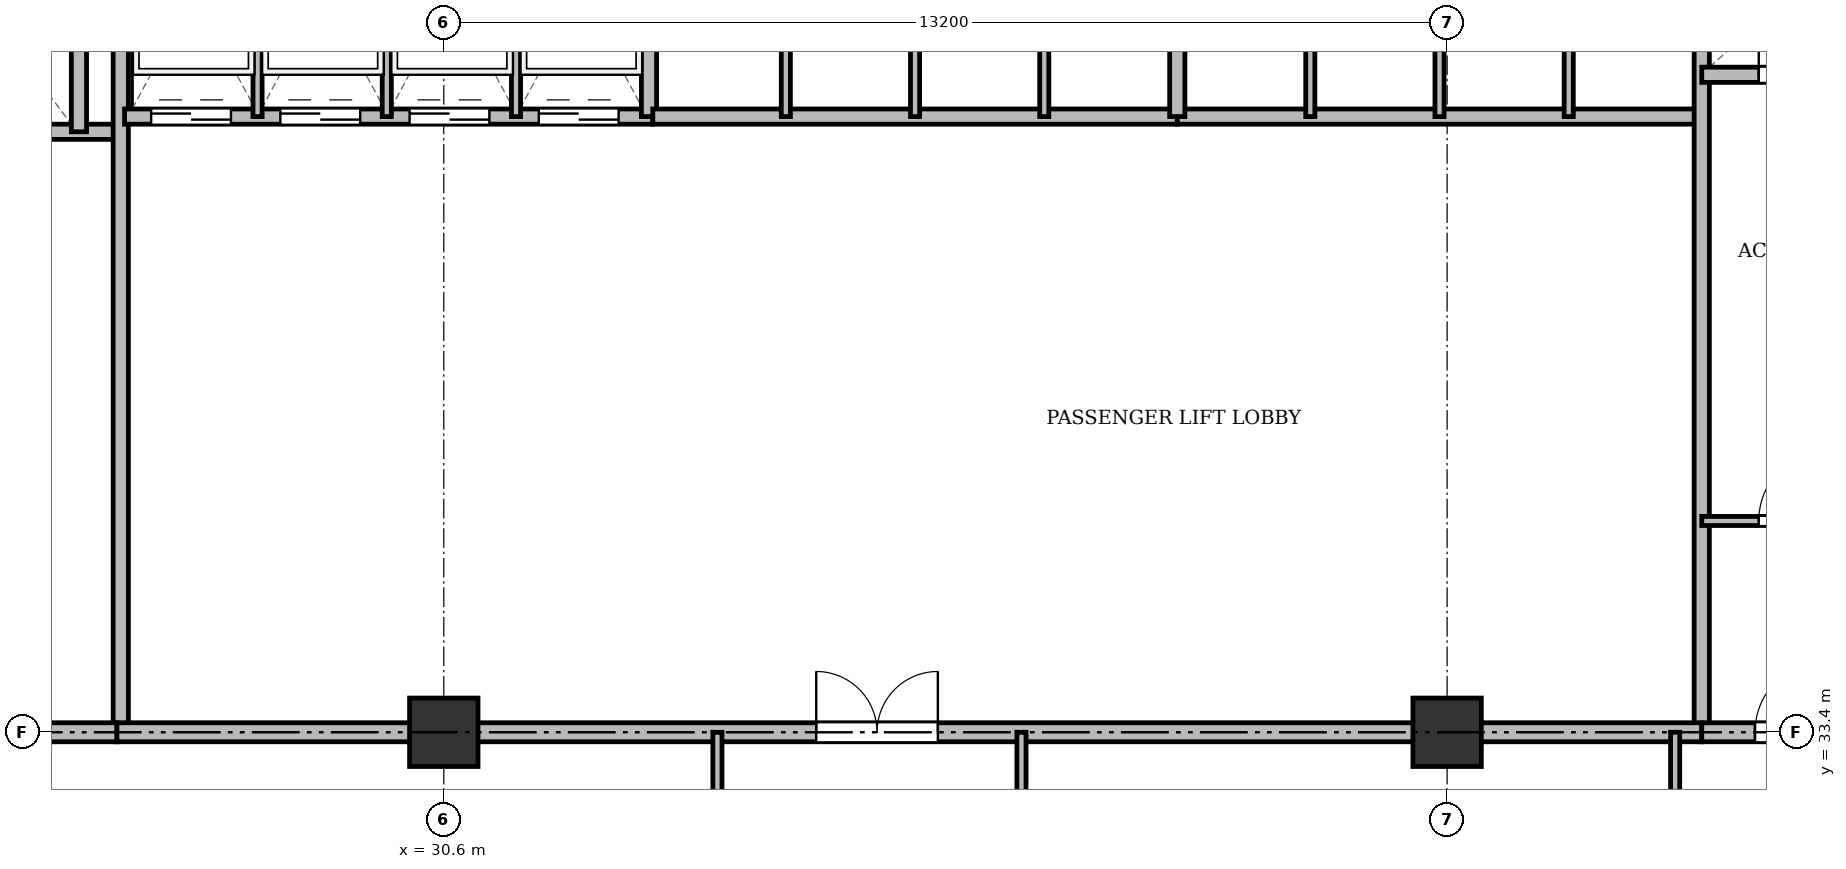
"""IFC4 building model, lengths in metres.
Left out: names, types, materials, properties, quantities, classifications, styles, units other than length and angle.
Written with IfcOpenShell. Run it as: python <this file> out.ifc"""

import sys

from ifc_helpers import new_model, si_unit, direction, frame, frame_2d, origin, origin_2d, place, context, subcontext, project, spatial, rectangle, extrude, source, transform, mapped, element, fill, save


model = new_model("IFC4")
c1 = context("Model", 3, precision=1e-05, world=origin(), true_north=direction((0.0, 1.0)))
c2 = subcontext(c1, "Body", "Model", "MODEL_VIEW")
j1 = project(units=[si_unit("LENGTHUNIT", "METRE"), si_unit("PLANEANGLEUNIT", "RADIAN")], contexts=[c1])
p1 = place(None, origin())
s1 = spatial("IfcSite", under=j1, at=p1, CompositionType="ELEMENT")
p2 = place(p1, origin())
s2 = spatial("IfcBuilding", under=s1, at=p2, CompositionType="ELEMENT")
p3 = place(p2, frame((0.0, 0.0, 48.7)))
s3 = spatial("IfcBuildingStorey", under=s2, at=p3, CompositionType="ELEMENT", Elevation=48.7)
m1 = source(origin(), c2, "Body", "SweptSolid", [
    extrude(rectangle(XDim=0.9, YDim=0.9, at=origin_2d()), origin(), (0.0, 0.0, 1.0), 3.6),
])
for number, where, z_axis, x_axis in (
    (1, (30.6, 33.4, 0.0), (0.0, 0.0, 1.0), (1.0, 0.0, 0.0)),
    (2, (43.8, 33.4, 0.0), (0.0, 0.0, 1.0), (1.0, 0.0, 0.0)),
):
    element("IfcColumn", number, at=place(p3, frame(where, z_axis=z_axis, x_axis=x_axis)), inside=s3, PredefinedType="COLUMN", context=c2, shape_type="MappedRepresentation", body=[
        mapped(m1, transform((0.0, 0.0, 0.0), x_axis=(1.0, 0.0, 0.0), y_axis=(0.0, 1.0, 0.0), z_axis=(0.0, 0.0, 1.0), scale=1.0)),
    ])
p4 = place(p3, frame((19.55, 41.3, 0.0), z_axis=(0.0, 0.0, 1.0), x_axis=(1.0, 0.0, 0.0)))
e3 = element("IfcWall", 3, at=p4, inside=s3, PredefinedType="SOLIDWALL", context=c2, shape_type="SweptSolid", body=[
    extrude(rectangle(XDim=6.75, YDim=0.2, at=frame_2d((3.375, 0.0))), origin(), (0.0, 0.0, 1.0), 3.34),
])
p5 = place(p4, frame((1.7, 0.0, 0.0)))
e4 = element("IfcOpeningElement", 4, at=p5, cuts=e3, PredefinedType="OPENING", context=c2, shape_type="SweptSolid", body=[
    extrude(rectangle(XDim=1.1, YDim=2.15, at=frame_2d((0.55, 1.075))), frame((0.0, 0.11, 0.0), z_axis=(0.0, -1.0, 0.0), x_axis=(1.0, 0.0, 0.0)), (0.0, 0.0, 1.0), 0.22),
])
p6 = place(p4, frame((4.4, 0.0, 0.0)))
e5 = element("IfcOpeningElement", 5, at=p6, cuts=e3, PredefinedType="OPENING", context=c2, shape_type="SweptSolid", body=[
    extrude(rectangle(XDim=1.1, YDim=2.15, at=frame_2d((0.55, 1.075))), frame((0.0, 0.11, 0.0), z_axis=(0.0, -1.0, 0.0), x_axis=(1.0, 0.0, 0.0)), (0.0, 0.0, 1.0), 0.22),
])
p7 = place(p3, frame((25.8, 41.3, 0.0), z_axis=(0.0, 0.0, 1.0), x_axis=(0.0, 1.0, 0.0)))
e6 = element("IfcWall", 6, at=p7, inside=s3, PredefinedType="SOLIDWALL", context=c2, shape_type="SweptSolid", body=[
    extrude(rectangle(XDim=3.4, YDim=0.2, at=frame_2d((1.7, 0.0))), origin(), (0.0, 0.0, 1.0), 3.34),
])
p8 = place(p3, frame((26.35, 33.4, 0.0), z_axis=(0.0, 0.0, 1.0), x_axis=(0.0, 1.0, 0.0)))
e7 = element("IfcWall", 7, at=p8, inside=s3, PredefinedType="SOLIDWALL", context=c2, shape_type="SweptSolid", body=[
    extrude(rectangle(XDim=11.3, YDim=0.2, at=frame_2d((5.65, 0.0))), origin(), (0.0, 0.0, 1.0), 2.69),
])
p9 = place(p3, frame((19.5, 33.4, 0.0), z_axis=(0.0, 0.0, 1.0), x_axis=(1.0, 0.0, 0.0)))
e8 = element("IfcWall", 8, at=p9, inside=s3, PredefinedType="PARTITIONING", context=c2, shape_type="SweptSolid", body=[
    extrude(rectangle(XDim=6.8, YDim=0.25, at=frame_2d((3.4, 0.0))), origin(), (0.0, 0.0, 1.0), 2.69),
])
p10 = place(p9, frame((0.75, 0.0, 0.0)))
e9 = element("IfcOpeningElement", 9, at=p10, cuts=e8, PredefinedType="OPENING", context=c2, shape_type="SweptSolid", body=[
    extrude(rectangle(XDim=1.6, YDim=2.2, at=frame_2d((0.8, 1.1))), frame((0.0, 0.135, 0.0), z_axis=(0.0, -1.0, 0.0), x_axis=(1.0, 0.0, 0.0)), (0.0, 0.0, 1.0), 0.27),
])
p11 = place(p3, frame((26.4, 41.5, 0.0), z_axis=(0.0, 0.0, 1.0), x_axis=(1.0, 0.0, 0.0)))
e10 = element("IfcWall", 10, at=p11, inside=s3, PredefinedType="SOLIDWALL", context=c2, shape_type="SweptSolid", body=[
    extrude(rectangle(XDim=6.95, YDim=0.2, at=frame_2d((3.475, 0.0))), origin(), (0.0, 0.0, 1.0), 3.34),
])
p12 = place(p11, frame((0.35, 0.0, 0.0)))
e11 = element("IfcOpeningElement", 11, at=p12, cuts=e10, PredefinedType="OPENING", context=c2, shape_type="SweptSolid", body=[
    extrude(rectangle(XDim=1.05, YDim=2.15, at=frame_2d((0.525, 1.075))), frame((0.0, 0.11, 0.0), z_axis=(0.0, -1.0, 0.0), x_axis=(1.0, 0.0, 0.0)), (0.0, 0.0, 1.0), 0.22),
])
p13 = place(p11, frame((2.05, 0.0, 0.0)))
e12 = element("IfcOpeningElement", 12, at=p13, cuts=e10, PredefinedType="OPENING", context=c2, shape_type="SweptSolid", body=[
    extrude(rectangle(XDim=1.05, YDim=2.15, at=frame_2d((0.525, 1.075))), frame((0.0, 0.11, 0.0), z_axis=(0.0, -1.0, 0.0), x_axis=(1.0, 0.0, 0.0)), (0.0, 0.0, 1.0), 0.22),
])
p14 = place(p11, frame((3.75, 0.0, 0.0)))
e13 = element("IfcOpeningElement", 13, at=p14, cuts=e10, PredefinedType="OPENING", context=c2, shape_type="SweptSolid", body=[
    extrude(rectangle(XDim=1.05, YDim=2.15, at=frame_2d((0.525, 1.075))), frame((0.0, 0.11, 0.0), z_axis=(0.0, -1.0, 0.0), x_axis=(1.0, 0.0, 0.0)), (0.0, 0.0, 1.0), 0.22),
])
p15 = place(p11, frame((5.45, 0.0, 0.0)))
e14 = element("IfcOpeningElement", 14, at=p15, cuts=e10, PredefinedType="OPENING", context=c2, shape_type="SweptSolid", body=[
    extrude(rectangle(XDim=1.05, YDim=2.15, at=frame_2d((0.525, 1.075))), frame((0.0, 0.11, 0.0), z_axis=(0.0, -1.0, 0.0), x_axis=(1.0, 0.0, 0.0)), (0.0, 0.0, 1.0), 0.22),
])
p16 = place(p3, frame((33.3, 41.5, 0.0), z_axis=(0.0, 0.0, 1.0), x_axis=(0.0, 1.0, 0.0)))
e15 = element("IfcWall", 15, at=p16, inside=s3, PredefinedType="SOLIDWALL", context=c2, shape_type="SweptSolid", body=[
    extrude(rectangle(XDim=3.2, YDim=0.2, at=frame_2d((1.6, 0.0))), origin(), (0.0, 0.0, 1.0), 3.34),
])
for number, where, z_axis, x_axis in (
    (16, (28.15, 41.5, 0.0), (0.0, 0.0, 1.0), (0.0, 1.0, 0.0)),
    (17, (29.85, 41.5, 0.0), (0.0, 0.0, 1.0), (0.0, 1.0, 0.0)),
    (18, (31.55, 41.5, 0.0), (0.0, 0.0, 1.0), (0.0, 1.0, 0.0)),
):
    element("IfcWall", number, at=place(p3, frame(where, z_axis=z_axis, x_axis=x_axis)), inside=s3, PredefinedType="PARTITIONING", context=c2, shape_type="SweptSolid", body=[
        extrude(rectangle(XDim=3.2, YDim=0.12, at=frame_2d((1.6, 0.0))), origin(), (0.0, 0.0, 1.0), 3.34),
    ])
p17 = place(p3, frame((33.35, 41.5, 0.0), z_axis=(0.0, 0.0, 1.0), x_axis=(1.0, 0.0, 0.0)))
e19 = element("IfcWall", 19, at=p17, inside=s3, PredefinedType="SOLIDWALL", context=c2, shape_type="SweptSolid", body=[
    extrude(rectangle(XDim=6.9, YDim=0.2, at=frame_2d((3.45, 0.0))), origin(), (0.0, 0.0, 1.0), 3.34),
])
for number, where, z_axis, x_axis in (
    (20, (35.1, 41.5, 0.0), (0.0, 0.0, 1.0), (0.0, 1.0, 0.0)),
    (21, (36.8, 41.5, 0.0), (0.0, 0.0, 1.0), (0.0, 1.0, 0.0)),
    (22, (38.5, 41.5, 0.0), (0.0, 0.0, 1.0), (0.0, 1.0, 0.0)),
):
    element("IfcWall", number, at=place(p3, frame(where, z_axis=z_axis, x_axis=x_axis)), inside=s3, PredefinedType="PARTITIONING", context=c2, shape_type="SweptSolid", body=[
        extrude(rectangle(XDim=3.2, YDim=0.12, at=frame_2d((1.6, 0.0))), origin(), (0.0, 0.0, 1.0), 3.34),
    ])
p18 = place(p3, frame((40.25, 41.5, 0.0), z_axis=(0.0, 0.0, 1.0), x_axis=(1.0, 0.0, 0.0)))
e23 = element("IfcWall", 23, at=p18, inside=s3, PredefinedType="SOLIDWALL", context=c2, shape_type="SweptSolid", body=[
    extrude(rectangle(XDim=6.9, YDim=0.2, at=frame_2d((3.45, 0.0))), origin(), (0.0, 0.0, 1.0), 2.752),
])
p19 = place(p3, frame((40.25, 41.5, 0.0), z_axis=(0.0, 0.0, 1.0), x_axis=(0.0, 1.0, 0.0)))
e24 = element("IfcWall", 24, at=p19, inside=s3, PredefinedType="SOLIDWALL", context=c2, shape_type="SweptSolid", body=[
    extrude(rectangle(XDim=3.2, YDim=0.2, at=frame_2d((1.6, 0.0))), origin(), (0.0, 0.0, 1.0), 3.34),
])
p20 = place(p3, frame((42.0, 41.5, 0.0), z_axis=(0.0, 0.0, 1.0), x_axis=(0.0, 1.0, 0.0)))
e25 = element("IfcWall", 25, at=p20, inside=s3, PredefinedType="PARTITIONING", context=c2, shape_type="SweptSolid", body=[
    extrude(rectangle(XDim=3.2, YDim=0.12, at=frame_2d((1.6, 0.0))), origin(), (0.0, 0.0, 1.0), 3.34),
])
p21 = place(p3, frame((43.7, 41.5, 0.0), z_axis=(0.0, 0.0, 1.0), x_axis=(0.0, 1.0, 0.0)))
e26 = element("IfcWall", 26, at=p21, inside=s3, PredefinedType="PARTITIONING", context=c2, shape_type="SweptSolid", body=[
    extrude(rectangle(XDim=3.2, YDim=0.12, at=frame_2d((1.6, 0.0))), origin(), (0.0, 0.0, 1.0), 2.752),
])
p22 = place(p3, frame((45.4, 41.5, 0.0), z_axis=(0.0, 0.0, 1.0), x_axis=(0.0, 1.0, 0.0)))
e27 = element("IfcWall", 27, at=p22, inside=s3, PredefinedType="PARTITIONING", context=c2, shape_type="SweptSolid", body=[
    extrude(rectangle(XDim=3.2, YDim=0.12, at=frame_2d((1.6, 0.0))), origin(), (0.0, 0.0, 1.0), 3.34),
])
p23 = place(p3, frame((47.15, 33.4, 0.0), z_axis=(0.0, 0.0, 1.0), x_axis=(0.0, 1.0, 0.0)))
e28 = element("IfcWall", 28, at=p23, inside=s3, PredefinedType="SOLIDWALL", context=c2, shape_type="SweptSolid", body=[
    extrude(rectangle(XDim=11.3, YDim=0.2, at=frame_2d((5.65, 0.0))), origin(), (0.0, 0.0, 1.0), 2.69),
])
p24 = place(p3, frame((26.3, 33.4, 0.0), z_axis=(0.0, 0.0, 1.0), x_axis=(1.0, 0.0, 0.0)))
e29 = element("IfcWall", 29, at=p24, inside=s3, PredefinedType="PARTITIONING", context=c2, shape_type="SweptSolid", body=[
    extrude(rectangle(XDim=20.85, YDim=0.25, at=frame_2d((10.425, 0.0))), origin(), (0.0, 0.0, 1.0), 2.69),
])
p25 = place(p24, frame((9.2, 0.0, 0.0)))
e30 = element("IfcOpeningElement", 30, at=p25, cuts=e29, PredefinedType="OPENING", context=c2, shape_type="SweptSolid", body=[
    extrude(rectangle(XDim=1.6, YDim=2.2, at=frame_2d((0.8, 1.1))), frame((0.0, 0.135, 0.0), z_axis=(0.0, -1.0, 0.0), x_axis=(1.0, 0.0, 0.0)), (0.0, 0.0, 1.0), 0.27),
])
p26 = place(p3, frame((47.15, 42.05, 0.0), z_axis=(0.0, 0.0, 1.0), x_axis=(1.0, 0.0, 0.0)))
e31 = element("IfcWall", 31, at=p26, inside=s3, PredefinedType="SOLIDWALL", context=c2, shape_type="SweptSolid", body=[
    extrude(rectangle(XDim=7.85, YDim=0.2, at=frame_2d((3.925, 0.0))), origin(), (0.0, 0.0, 1.0), 2.752),
])
p27 = place(p26, frame((0.75, 0.0, 0.0)))
e32 = element("IfcOpeningElement", 32, at=p27, cuts=e31, PredefinedType="OPENING", context=c2, shape_type="SweptSolid", body=[
    extrude(rectangle(XDim=0.9, YDim=2.1, at=frame_2d((0.45, 1.05))), frame((0.0, 0.11, 0.0), z_axis=(0.0, -1.0, 0.0), x_axis=(1.0, 0.0, 0.0)), (0.0, 0.0, 1.0), 0.22),
])
p28 = place(p26, frame((3.85, 0.0, 0.0)))
e33 = element("IfcOpeningElement", 33, at=p28, cuts=e31, PredefinedType="OPENING", context=c2, shape_type="SweptSolid", body=[
    extrude(rectangle(XDim=0.9, YDim=2.1, at=frame_2d((0.45, 1.05))), frame((0.0, 0.11, 0.0), z_axis=(0.0, -1.0, 0.0), x_axis=(1.0, 0.0, 0.0)), (0.0, 0.0, 1.0), 0.22),
])
p29 = place(p3, frame((47.15, 36.18, 0.0), z_axis=(0.0, 0.0, 1.0), x_axis=(1.0, 0.0, 0.0)))
e34 = element("IfcWall", 34, at=p29, inside=s3, PredefinedType="PARTITIONING", context=c2, shape_type="SweptSolid", body=[
    extrude(rectangle(XDim=5.3, YDim=0.12, at=frame_2d((2.65, 0.0))), origin(), (0.0, 0.0, 1.0), 2.752),
])
p30 = place(p29, frame((0.75, 0.0, 0.0)))
e35 = element("IfcOpeningElement", 35, at=p30, cuts=e34, PredefinedType="OPENING", context=c2, shape_type="SweptSolid", body=[
    extrude(rectangle(XDim=0.95, YDim=2.15, at=frame_2d((0.475, 1.075))), frame((0.0, 0.07, 0.0), z_axis=(0.0, -1.0, 0.0), x_axis=(1.0, 0.0, 0.0)), (0.0, 0.0, 1.0), 0.14),
])
p31 = place(p29, frame((3.45, 0.0, 0.0)))
e36 = element("IfcOpeningElement", 36, at=p31, cuts=e34, PredefinedType="OPENING", context=c2, shape_type="SweptSolid", body=[
    extrude(rectangle(XDim=0.95, YDim=2.15, at=frame_2d((0.475, 1.075))), frame((0.0, 0.07, 0.0), z_axis=(0.0, -1.0, 0.0), x_axis=(1.0, 0.0, 0.0)), (0.0, 0.0, 1.0), 0.14),
])
p32 = place(p3, frame((47.15, 33.4, 0.0), z_axis=(0.0, 0.0, 1.0), x_axis=(1.0, 0.0, 0.0)))
e37 = element("IfcWall", 37, at=p32, inside=s3, PredefinedType="PARTITIONING", context=c2, shape_type="SweptSolid", body=[
    extrude(rectangle(XDim=11.15, YDim=0.25, at=frame_2d((5.575, 0.0))), origin(), (0.0, 0.0, 1.0), 2.69),
])
p33 = place(p32, frame((0.7, 0.0, 0.0)))
e38 = element("IfcOpeningElement", 38, at=p33, cuts=e37, PredefinedType="OPENING", context=c2, shape_type="SweptSolid", body=[
    extrude(rectangle(XDim=0.95, YDim=2.15, at=frame_2d((0.475, 1.075))), frame((0.0, 0.135, 0.0), z_axis=(0.0, -1.0, 0.0), x_axis=(1.0, 0.0, 0.0)), (0.0, 0.0, 1.0), 0.27),
])
p34 = place(p32, frame((6.0, 0.0, 0.0)))
e39 = element("IfcOpeningElement", 39, at=p34, cuts=e37, PredefinedType="OPENING", context=c2, shape_type="SweptSolid", body=[
    extrude(rectangle(XDim=1.2, YDim=2.15, at=frame_2d((0.6, 1.075))), frame((0.0, 0.135, 0.0), z_axis=(0.0, -1.0, 0.0), x_axis=(1.0, 0.0, 0.0)), (0.0, 0.0, 1.0), 0.27),
])
for number, where, z_axis, x_axis in (
    (40, (34.2, 29.8, 0.0), (0.0, 0.0, 1.0), (0.0, 1.0, 0.0)),
    (41, (38.2, 29.8, 0.0), (0.0, 0.0, 1.0), (0.0, 1.0, 0.0)),
    (42, (46.8, 29.8, 0.0), (0.0, 0.0, 1.0), (0.0, 1.0, 0.0)),
):
    element("IfcWall", number, at=place(p3, frame(where, z_axis=z_axis, x_axis=x_axis)), inside=s3, PredefinedType="PARTITIONING", context=c2, shape_type="SweptSolid", body=[
        extrude(rectangle(XDim=3.6, YDim=0.12, at=frame_2d((1.8, 0.0))), origin(), (0.0, 0.0, 1.0), 2.69),
    ])
m2 = source(origin(), c2, "Body", "SweptSolid", [
    extrude(rectangle(XDim=1.05, YDim=2.15, at=frame_2d((0.525, 1.075))), frame((0.0, 0.025, 0.0), z_axis=(0.0, -1.0, 0.0), x_axis=(1.0, 0.0, 0.0)), (0.0, 0.0, 1.0), 0.05),
])
p35 = place(p12, origin())
e43 = element("IfcDoor", 43, at=p35, inside=s3, OperationType="DOUBLE_DOOR_SLIDING", PredefinedType="DOOR", context=c2, shape_type="MappedRepresentation", body=[
    mapped(m2, transform((0.0, 0.0, 0.0), x_axis=(1.0, 0.0, 0.0), y_axis=(0.0, 1.0, 0.0), z_axis=(0.0, 0.0, 1.0), scale=1.0)),
])
fill(e11, e43)
p36 = place(p13, origin())
e44 = element("IfcDoor", 44, at=p36, inside=s3, OperationType="DOUBLE_DOOR_SLIDING", PredefinedType="DOOR", context=c2, shape_type="MappedRepresentation", body=[
    mapped(m2, transform((0.0, 0.0, 0.0), x_axis=(1.0, 0.0, 0.0), y_axis=(0.0, 1.0, 0.0), z_axis=(0.0, 0.0, 1.0), scale=1.0)),
])
fill(e12, e44)
p37 = place(p14, origin())
e45 = element("IfcDoor", 45, at=p37, inside=s3, OperationType="DOUBLE_DOOR_SLIDING", PredefinedType="DOOR", context=c2, shape_type="MappedRepresentation", body=[
    mapped(m2, transform((0.0, 0.0, 0.0), x_axis=(1.0, 0.0, 0.0), y_axis=(0.0, 1.0, 0.0), z_axis=(0.0, 0.0, 1.0), scale=1.0)),
])
fill(e13, e45)
p38 = place(p15, origin())
e46 = element("IfcDoor", 46, at=p38, inside=s3, OperationType="DOUBLE_DOOR_SLIDING", PredefinedType="DOOR", context=c2, shape_type="MappedRepresentation", body=[
    mapped(m2, transform((0.0, 0.0, 0.0), x_axis=(1.0, 0.0, 0.0), y_axis=(0.0, 1.0, 0.0), z_axis=(0.0, 0.0, 1.0), scale=1.0)),
])
fill(e14, e46)
m3 = source(origin(), c2, "Body", "SweptSolid", [
    extrude(rectangle(XDim=1.6, YDim=2.2, at=frame_2d((0.8, 1.1))), frame((0.0, 0.025, 0.0), z_axis=(0.0, -1.0, 0.0), x_axis=(1.0, 0.0, 0.0)), (0.0, 0.0, 1.0), 0.05),
])
p39 = place(p25, origin())
e47 = element("IfcDoor", 47, at=p39, inside=s3, OperationType="DOUBLE_DOOR_SINGLE_SWING", PredefinedType="DOOR", context=c2, shape_type="MappedRepresentation", body=[
    mapped(m3, transform((0.0, 0.0, 0.0), x_axis=(1.0, 0.0, 0.0), y_axis=(0.0, 1.0, 0.0), z_axis=(0.0, 0.0, 1.0), scale=1.0)),
])
fill(e30, e47)
m4 = source(origin(), c2, "Body", "SweptSolid", [
    extrude(rectangle(XDim=0.9, YDim=2.1, at=frame_2d((0.45, 1.05))), frame((0.0, 0.025, 0.0), z_axis=(0.0, -1.0, 0.0), x_axis=(1.0, 0.0, 0.0)), (0.0, 0.0, 1.0), 0.05),
])
p40 = place(p27, origin())
e48 = element("IfcDoor", 48, at=p40, inside=s3, OperationType="SINGLE_SWING_LEFT", PredefinedType="DOOR", context=c2, shape_type="MappedRepresentation", body=[
    mapped(m4, transform((0.0, 0.0, 0.0), x_axis=(1.0, 0.0, 0.0), y_axis=(0.0, 1.0, 0.0), z_axis=(0.0, 0.0, 1.0), scale=1.0)),
])
fill(e32, e48)
m5 = source(origin(), c2, "Body", "SweptSolid", [
    extrude(rectangle(XDim=0.95, YDim=2.15, at=frame_2d((0.475, 1.075))), frame((0.0, 0.025, 0.0), z_axis=(0.0, -1.0, 0.0), x_axis=(1.0, 0.0, 0.0)), (0.0, 0.0, 1.0), 0.05),
])
p41 = place(p30, origin())
e49 = element("IfcDoor", 49, at=p41, inside=s3, OperationType="SINGLE_SWING_RIGHT", PredefinedType="DOOR", context=c2, shape_type="MappedRepresentation", body=[
    mapped(m5, transform((0.0, 0.0, 0.0), x_axis=(1.0, 0.0, 0.0), y_axis=(0.0, 1.0, 0.0), z_axis=(0.0, 0.0, 1.0), scale=1.0)),
])
fill(e35, e49)
p42 = place(p33, origin())
e50 = element("IfcDoor", 50, at=p42, inside=s3, OperationType="SINGLE_SWING_RIGHT", PredefinedType="DOOR", context=c2, shape_type="MappedRepresentation", body=[
    mapped(m5, transform((0.0, 0.0, 0.0), x_axis=(1.0, 0.0, 0.0), y_axis=(0.0, 1.0, 0.0), z_axis=(0.0, 0.0, 1.0), scale=1.0)),
])
fill(e38, e50)
save(model, sys.argv[1])
